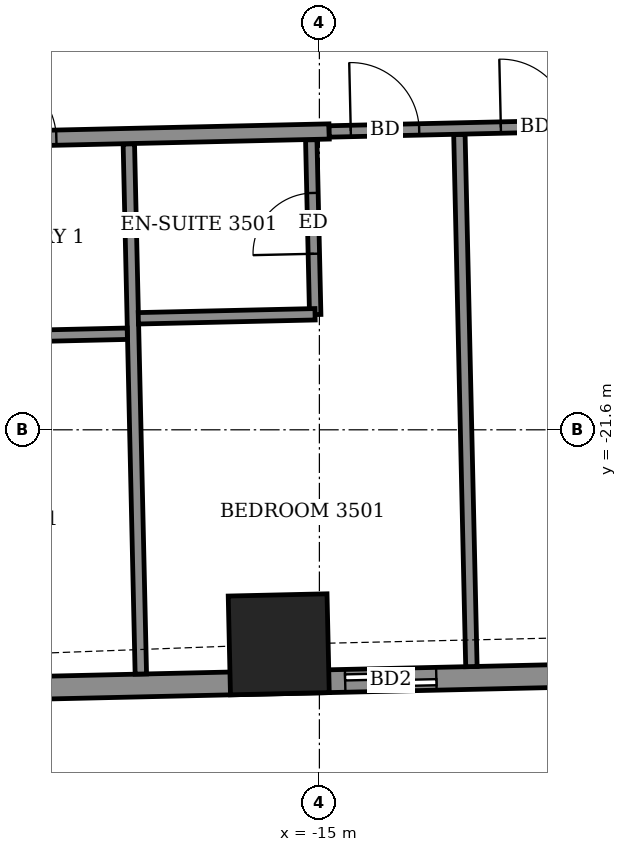
"""IFC4 building model, lengths in metres.
Left out: names, types, materials, properties, quantities, classifications, styles, units other than length and angle.
Written with IfcOpenShell. Run it as: python <this file> out.ifc"""

import sys

from ifc_helpers import new_model, si_unit, direction, frame, frame_2d, origin, origin_2d, place, context, subcontext, project, spatial, rectangle, extrude, element, fill, save


model = new_model("IFC4")
c1 = context("Model", 3, precision=1e-05, world=origin(), true_north=direction((0.0, 1.0)))
c2 = subcontext(c1, "Body", "Model", "MODEL_VIEW")
j1 = project(units=[si_unit("LENGTHUNIT", "METRE"), si_unit("PLANEANGLEUNIT", "RADIAN")], contexts=[c1])
p1 = place(None, origin())
s1 = spatial("IfcSite", under=j1, at=p1, CompositionType="ELEMENT")
p2 = place(p1, origin())
s2 = spatial("IfcBuilding", under=s1, at=p2, CompositionType="ELEMENT")
p3 = place(p2, frame((0.0, 0.0, 140.9)))
s3 = spatial("IfcBuildingStorey", under=s2, at=p3, CompositionType="ELEMENT", Elevation=140.9)
p4 = place(p3, frame((-15.535, -24.422, -0.55), z_axis=(0.0, 0.0, 1.0), x_axis=(0.999742129581, 0.022708464065, 0.0)))
e1 = element("IfcColumn", 1, at=p4, inside=s3, PredefinedType="COLUMN", context=c2, shape_type="SweptSolid", body=[
    extrude(rectangle(XDim=1.3, YDim=1.3, at=origin_2d()), origin(), (0.0, 0.0, 1.0), 3.6),
])
p5 = place(p3, frame((-22.396, -25.078, 0.0), z_axis=(0.0, 0.0, 1.0), x_axis=(0.99974279854, 0.022678993965, 0.0)))
e2 = element("IfcWall", 2, at=p5, inside=s3, PredefinedType="SOLIDWALL", context=c2, shape_type="SweptSolid", body=[
    extrude(rectangle(XDim=41.844, YDim=0.3, at=frame_2d((20.922, 0.0))), origin(), (0.0, 0.0, 1.0), 3.05),
])
p6 = place(p5, frame((2.196, 0.0, 0.0)))
e3 = element("IfcOpeningElement", 3, at=p6, cuts=e2, PredefinedType="OPENING", context=c2, shape_type="SweptSolid", body=[
    extrude(rectangle(XDim=1.5, YDim=2.4, at=frame_2d((0.75, 1.2))), frame((0.0, 0.16, 0.0), z_axis=(0.0, -1.0, 0.0), x_axis=(1.0, 0.0, 0.0)), (0.0, 0.0, 1.0), 0.32),
])
p7 = place(p5, frame((7.737, 0.0, 0.0)))
e4 = element("IfcOpeningElement", 4, at=p7, cuts=e2, PredefinedType="OPENING", context=c2, shape_type="SweptSolid", body=[
    extrude(rectangle(XDim=1.2, YDim=2.4, at=frame_2d((0.6, 1.2))), frame((0.0, 0.16, 0.0), z_axis=(0.0, -1.0, 0.0), x_axis=(1.0, 0.0, 0.0)), (0.0, 0.0, 1.0), 0.32),
])
p8 = place(p5, frame((10.699, 0.0, 0.0)))
e5 = element("IfcOpeningElement", 5, at=p8, cuts=e2, PredefinedType="OPENING", context=c2, shape_type="SweptSolid", body=[
    extrude(rectangle(XDim=1.5, YDim=2.4, at=frame_2d((0.75, 1.2))), frame((0.0, 0.16, 0.0), z_axis=(0.0, -1.0, 0.0), x_axis=(1.0, 0.0, 0.0)), (0.0, 0.0, 1.0), 0.32),
])
p9 = place(p5, frame((15.549, 0.0, 0.0)))
e6 = element("IfcOpeningElement", 6, at=p9, cuts=e2, PredefinedType="OPENING", context=c2, shape_type="SweptSolid", body=[
    extrude(rectangle(XDim=1.5, YDim=2.4, at=frame_2d((0.75, 1.2))), frame((0.0, 0.16, 0.0), z_axis=(0.0, -1.0, 0.0), x_axis=(1.0, 0.0, 0.0)), (0.0, 0.0, 1.0), 0.32),
])
p10 = place(p5, frame((18.661, 0.0, 0.0)))
e7 = element("IfcOpeningElement", 7, at=p10, cuts=e2, PredefinedType="OPENING", context=c2, shape_type="SweptSolid", body=[
    extrude(rectangle(XDim=1.5, YDim=2.4, at=frame_2d((0.75, 1.2))), frame((0.0, 0.16, 0.0), z_axis=(0.0, -1.0, 0.0), x_axis=(1.0, 0.0, 0.0)), (0.0, 0.0, 1.0), 0.32),
])
p11 = place(p5, frame((24.125, 0.0, 0.0)))
e8 = element("IfcOpeningElement", 8, at=p11, cuts=e2, PredefinedType="OPENING", context=c2, shape_type="SweptSolid", body=[
    extrude(rectangle(XDim=1.5, YDim=2.4, at=frame_2d((0.75, 1.2))), frame((0.0, 0.16, 0.0), z_axis=(0.0, -1.0, 0.0), x_axis=(1.0, 0.0, 0.0)), (0.0, 0.0, 1.0), 0.32),
])
p12 = place(p5, frame((29.298, 0.0, 0.0)))
e9 = element("IfcOpeningElement", 9, at=p12, cuts=e2, PredefinedType="OPENING", context=c2, shape_type="SweptSolid", body=[
    extrude(rectangle(XDim=1.5, YDim=2.4, at=frame_2d((0.75, 1.2))), frame((0.0, 0.16, 0.0), z_axis=(0.0, -1.0, 0.0), x_axis=(1.0, 0.0, 0.0)), (0.0, 0.0, 1.0), 0.32),
])
p13 = place(p5, frame((32.41, 0.0, 0.0)))
e10 = element("IfcOpeningElement", 10, at=p13, cuts=e2, PredefinedType="OPENING", context=c2, shape_type="SweptSolid", body=[
    extrude(rectangle(XDim=1.5, YDim=2.4, at=frame_2d((0.75, 1.2))), frame((0.0, 0.16, 0.0), z_axis=(0.0, -1.0, 0.0), x_axis=(1.0, 0.0, 0.0)), (0.0, 0.0, 1.0), 0.32),
])
p14 = place(p5, frame((37.324, 0.0, 0.9)))
e11 = element("IfcOpeningElement", 11, at=p14, cuts=e2, PredefinedType="OPENING", context=c2, shape_type="SweptSolid", body=[
    extrude(rectangle(XDim=2.4, YDim=1.5, at=frame_2d((1.2, 0.75))), frame((0.0, 0.16, 0.0), z_axis=(0.0, -1.0, 0.0), x_axis=(1.0, 0.0, 0.0)), (0.0, 0.0, 1.0), 0.32),
])
p15 = place(p3, frame((-17.349, -24.813, 0.0), z_axis=(0.0, 0.0, 1.0), x_axis=(-0.022644288452, 0.999743585226, 0.0)))
e12 = element("IfcWall", 12, at=p15, inside=s3, PredefinedType="PARTITIONING", context=c2, shape_type="SweptSolid", body=[
    extrude(rectangle(XDim=6.976, YDim=0.15, at=frame_2d((3.488, 0.0))), origin(), (0.0, 0.0, 1.0), 2.55),
])
p16 = place(p3, frame((-13.0, -24.715, 0.0), z_axis=(0.0, 0.0, 1.0), x_axis=(-0.02255982614, 0.999745494736, 0.0)))
e13 = element("IfcWall", 13, at=p16, inside=s3, PredefinedType="PARTITIONING", context=c2, shape_type="SweptSolid", body=[
    extrude(rectangle(XDim=7.002, YDim=0.15, at=frame_2d((3.501, 0.0))), origin(), (0.0, 0.0, 1.0), 2.55),
])
p17 = place(p3, frame((-20.251, -20.398, 0.0), z_axis=(0.0, 0.0, 1.0), x_axis=(0.999740955847, 0.022760079124, 0.0)))
e14 = element("IfcWall", 14, at=p17, inside=s3, PredefinedType="PARTITIONING", context=c2, shape_type="SweptSolid", body=[
    extrude(rectangle(XDim=2.725, YDim=0.15, at=frame_2d((1.362, 0.0))), origin(), (0.0, 0.0, 1.0), 3.05),
])
p18 = place(p3, frame((-15.055, -20.084, 0.0), z_axis=(0.0, 0.0, 1.0), x_axis=(-0.022612884682, 0.999744296031, 0.0)))
e15 = element("IfcWall", 15, at=p18, inside=s3, PredefinedType="PARTITIONING", context=c2, shape_type="SweptSolid", body=[
    extrude(rectangle(XDim=2.3, YDim=0.15, at=frame_2d((1.15, 0.0))), origin(), (0.0, 0.0, 1.0), 3.05),
])
p19 = place(p18, frame((0.8, 0.0, 0.0)))
e16 = element("IfcOpeningElement", 16, at=p19, cuts=e15, PredefinedType="OPENING", context=c2, shape_type="SweptSolid", body=[
    extrude(rectangle(XDim=0.8, YDim=2.1, at=frame_2d((0.4, 1.05))), frame((0.0, 0.085, 0.0), z_axis=(0.0, -1.0, 0.0), x_axis=(1.0, 0.0, 0.0)), (0.0, 0.0, 1.0), 0.17),
])
p20 = place(p3, frame((-17.382, -20.133, 0.0), z_axis=(0.0, 0.0, 1.0), x_axis=(0.99974053329, 0.022778632478, 0.0)))
e17 = element("IfcWall", 17, at=p20, inside=s3, PredefinedType="PARTITIONING", context=c2, shape_type="SweptSolid", body=[
    extrude(rectangle(XDim=2.326, YDim=0.15, at=frame_2d((1.163, 0.0))), origin(), (0.0, 0.0, 1.0), 3.05),
])
p21 = place(p3, frame((-25.709, -17.921, 0.0), z_axis=(0.0, 0.0, 1.0), x_axis=(0.999742764922, 0.022680475901, 0.0)))
e18 = element("IfcWall", 18, at=p21, inside=s3, PredefinedType="PARTITIONING", context=c2, shape_type="SweptSolid", body=[
    extrude(rectangle(XDim=10.84, YDim=0.2, at=frame_2d((5.42, 0.0))), origin(), (0.0, 0.0, 1.0), 3.05),
])
p22 = place(p21, frame((1.5, 0.0, 0.0)))
e19 = element("IfcOpeningElement", 19, at=p22, cuts=e18, PredefinedType="OPENING", context=c2, shape_type="SweptSolid", body=[
    extrude(rectangle(XDim=1.0, YDim=2.1, at=frame_2d((0.5, 1.05))), frame((0.0, 0.11, 0.0), z_axis=(0.0, -1.0, 0.0), x_axis=(1.0, 0.0, 0.0)), (0.0, 0.0, 1.0), 0.22),
])
p23 = place(p21, frame((6.35, 0.0, 0.0)))
e20 = element("IfcOpeningElement", 20, at=p23, cuts=e18, PredefinedType="OPENING", context=c2, shape_type="SweptSolid", body=[
    extrude(rectangle(XDim=0.9, YDim=2.1, at=frame_2d((0.45, 1.05))), frame((0.0, 0.11, 0.0), z_axis=(0.0, -1.0, 0.0), x_axis=(1.0, 0.0, 0.0)), (0.0, 0.0, 1.0), 0.22),
])
p24 = place(p3, frame((-14.871, -17.675, 0.0), z_axis=(0.0, 0.0, 1.0), x_axis=(0.999742359486, 0.02269834024, 0.0)))
e21 = element("IfcWall", 21, at=p24, inside=s3, PredefinedType="PARTITIONING", context=c2, shape_type="SweptSolid", body=[
    extrude(rectangle(XDim=30.536, YDim=0.15, at=frame_2d((15.268, 0.0))), origin(), (0.0, 0.0, 1.0), 3.05),
])
p25 = place(p24, frame((0.284, 0.0, 0.0)))
e22 = element("IfcOpeningElement", 22, at=p25, cuts=e21, PredefinedType="OPENING", context=c2, shape_type="SweptSolid", body=[
    extrude(rectangle(XDim=0.9, YDim=2.1, at=frame_2d((0.45, 1.05))), frame((0.0, 0.085, 0.0), z_axis=(0.0, -1.0, 0.0), x_axis=(1.0, 0.0, 0.0)), (0.0, 0.0, 1.0), 0.17),
])
p26 = place(p24, frame((2.259, 0.0, 0.0)))
e23 = element("IfcOpeningElement", 23, at=p26, cuts=e21, PredefinedType="OPENING", context=c2, shape_type="SweptSolid", body=[
    extrude(rectangle(XDim=0.9, YDim=2.1, at=frame_2d((0.45, 1.05))), frame((0.0, 0.085, 0.0), z_axis=(0.0, -1.0, 0.0), x_axis=(1.0, 0.0, 0.0)), (0.0, 0.0, 1.0), 0.17),
])
p27 = place(p24, frame((9.109, 0.0, 0.0)))
e24 = element("IfcOpeningElement", 24, at=p27, cuts=e21, PredefinedType="OPENING", context=c2, shape_type="SweptSolid", body=[
    extrude(rectangle(XDim=0.9, YDim=2.1, at=frame_2d((0.45, 1.05))), frame((0.0, 0.085, 0.0), z_axis=(0.0, -1.0, 0.0), x_axis=(1.0, 0.0, 0.0)), (0.0, 0.0, 1.0), 0.17),
])
p28 = place(p24, frame((11.109, 0.0, 0.0)))
e25 = element("IfcOpeningElement", 25, at=p28, cuts=e21, PredefinedType="OPENING", context=c2, shape_type="SweptSolid", body=[
    extrude(rectangle(XDim=0.9, YDim=2.1, at=frame_2d((0.45, 1.05))), frame((0.0, 0.085, 0.0), z_axis=(0.0, -1.0, 0.0), x_axis=(1.0, 0.0, 0.0)), (0.0, 0.0, 1.0), 0.17),
])
p29 = place(p24, frame((17.934, 0.0, 0.0)))
e26 = element("IfcOpeningElement", 26, at=p29, cuts=e21, PredefinedType="OPENING", context=c2, shape_type="SweptSolid", body=[
    extrude(rectangle(XDim=0.9, YDim=2.1, at=frame_2d((0.45, 1.05))), frame((0.0, 0.085, 0.0), z_axis=(0.0, -1.0, 0.0), x_axis=(1.0, 0.0, 0.0)), (0.0, 0.0, 1.0), 0.17),
])
p30 = place(p24, frame((20.109, 0.0, 0.0)))
e27 = element("IfcOpeningElement", 27, at=p30, cuts=e21, PredefinedType="OPENING", context=c2, shape_type="SweptSolid", body=[
    extrude(rectangle(XDim=0.9, YDim=2.1, at=frame_2d((0.45, 1.05))), frame((0.0, 0.085, 0.0), z_axis=(0.0, -1.0, 0.0), x_axis=(1.0, 0.0, 0.0)), (0.0, 0.0, 1.0), 0.17),
])
p31 = place(p24, frame((27.009, 0.0, 0.0)))
e28 = element("IfcOpeningElement", 28, at=p31, cuts=e21, PredefinedType="OPENING", context=c2, shape_type="SweptSolid", body=[
    extrude(rectangle(XDim=0.9, YDim=2.1, at=frame_2d((0.45, 1.05))), frame((0.0, 0.085, 0.0), z_axis=(0.0, -1.0, 0.0), x_axis=(1.0, 0.0, 0.0)), (0.0, 0.0, 1.0), 0.17),
])
p32 = place(p24, frame((29.209, 0.0, 0.0)))
e29 = element("IfcOpeningElement", 29, at=p32, cuts=e21, PredefinedType="OPENING", context=c2, shape_type="SweptSolid", body=[
    extrude(rectangle(XDim=0.9, YDim=2.1, at=frame_2d((0.45, 1.05))), frame((0.0, 0.085, 0.0), z_axis=(0.0, -1.0, 0.0), x_axis=(1.0, 0.0, 0.0)), (0.0, 0.0, 1.0), 0.17),
])
p33 = place(p7, origin())
e30 = element("IfcDoor", 30, at=p33, inside=s3, OperationType="SLIDING_TO_LEFT", PredefinedType="DOOR", context=c2, shape_type="SweptSolid", body=[
    extrude(rectangle(XDim=1.2, YDim=2.4, at=frame_2d((0.6, 1.2))), frame((0.0, 0.025, 0.0), z_axis=(0.0, -1.0, 0.0), x_axis=(1.0, 0.0, 0.0)), (0.0, 0.0, 1.0), 0.05),
])
fill(e4, e30)
p34 = place(p23, origin())
e31 = element("IfcDoor", 31, at=p34, inside=s3, OperationType="SINGLE_SWING_LEFT", PredefinedType="DOOR", context=c2, shape_type="SweptSolid", body=[
    extrude(rectangle(XDim=0.9, YDim=2.1, at=frame_2d((0.45, 1.05))), frame((0.0, 0.025, 0.0), z_axis=(0.0, -1.0, 0.0), x_axis=(1.0, 0.0, 0.0)), (0.0, 0.0, 1.0), 0.05),
])
fill(e20, e31)
p35 = place(p25, origin())
e32 = element("IfcDoor", 32, at=p35, inside=s3, OperationType="SINGLE_SWING_LEFT", PredefinedType="DOOR", context=c2, shape_type="SweptSolid", body=[
    extrude(rectangle(XDim=0.9, YDim=2.1, at=frame_2d((0.45, 1.05))), frame((0.0, 0.025, 0.0), z_axis=(0.0, -1.0, 0.0), x_axis=(1.0, 0.0, 0.0)), (0.0, 0.0, 1.0), 0.05),
])
fill(e22, e32)
p36 = place(p19, origin())
e33 = element("IfcDoor", 33, at=p36, inside=s3, OperationType="SINGLE_SWING_LEFT", PredefinedType="DOOR", context=c2, shape_type="SweptSolid", body=[
    extrude(rectangle(XDim=0.8, YDim=2.1, at=frame_2d((0.4, 1.05))), frame((0.0, 0.025, 0.0), z_axis=(0.0, -1.0, 0.0), x_axis=(1.0, 0.0, 0.0)), (0.0, 0.0, 1.0), 0.05),
])
fill(e16, e33)
p37 = place(p26, origin())
e34 = element("IfcDoor", 34, at=p37, inside=s3, OperationType="SINGLE_SWING_RIGHT", PredefinedType="DOOR", context=c2, shape_type="SweptSolid", body=[
    extrude(rectangle(XDim=0.9, YDim=2.1, at=frame_2d((0.45, 1.05))), frame((0.0, 0.025, 0.0), z_axis=(0.0, -1.0, 0.0), x_axis=(1.0, 0.0, 0.0)), (0.0, 0.0, 1.0), 0.05),
])
fill(e23, e34)
save(model, sys.argv[1])
